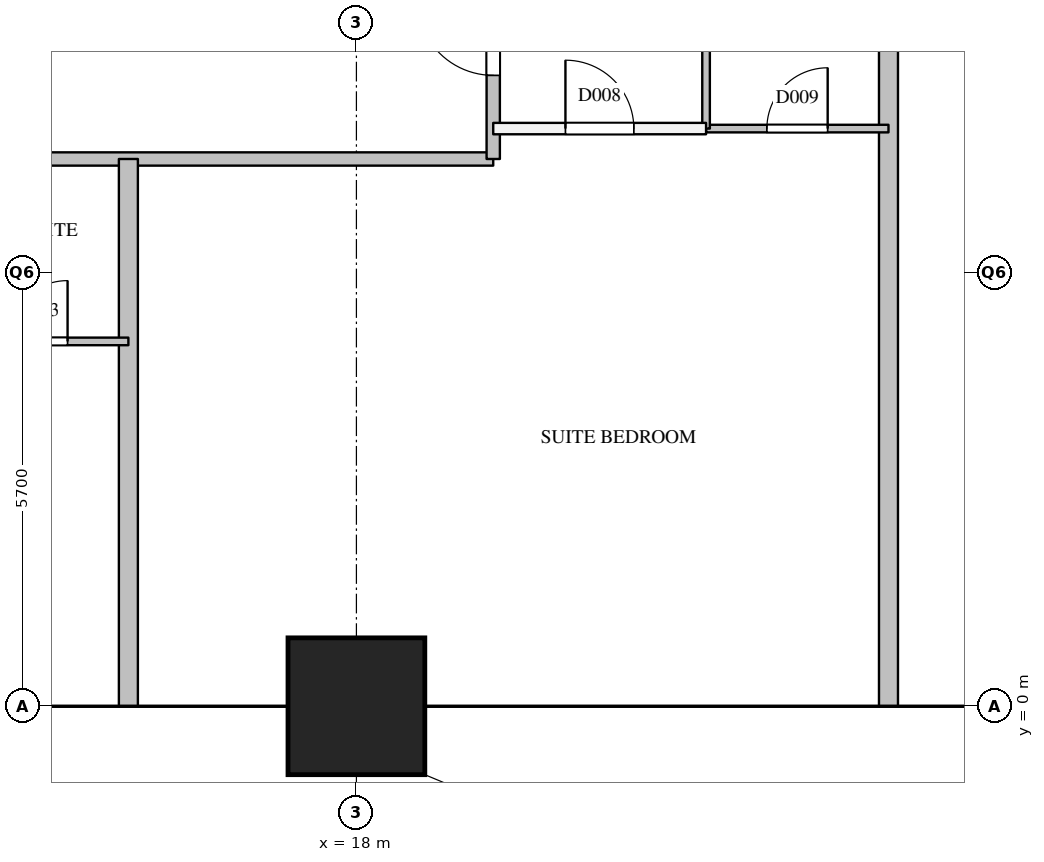
"""IFC4 building model, lengths in metres.
Left out: names, types, materials, properties, quantities, classifications, styles, units other than length and angle.
Written with IfcOpenShell. Run it as: python <this file> out.ifc"""

import sys

from ifc_helpers import new_model, si_unit, direction, frame, frame_2d, origin, origin_2d, place, context, subcontext, project, spatial, rectangle, extrude, element, fill, save


model = new_model("IFC4")
c1 = context("Model", 3, precision=1e-05, world=origin(), true_north=direction((0.0, 1.0)))
c2 = subcontext(c1, "Body", "Model", "MODEL_VIEW")
j1 = project(units=[si_unit("LENGTHUNIT", "METRE"), si_unit("PLANEANGLEUNIT", "RADIAN")], contexts=[c1])
p1 = place(None, origin())
s1 = spatial("IfcSite", under=j1, at=p1, CompositionType="ELEMENT")
p2 = place(p1, origin())
s2 = spatial("IfcBuilding", under=s1, at=p2, CompositionType="ELEMENT")
p3 = place(p2, frame((0.0, 0.0, 72.8)))
s3 = spatial("IfcBuildingStorey", under=s2, at=p3, CompositionType="ELEMENT", Elevation=72.8)
p4 = place(p3, frame((18.0, 0.0, 0.0), z_axis=(0.0, 0.0, 1.0), x_axis=(1.0, 0.0, 0.0)))
e1 = element("IfcColumn", 1, at=p4, inside=s3, PredefinedType="COLUMN", context=c2, shape_type="SweptSolid", body=[
    extrude(rectangle(XDim=1.8, YDim=1.8, at=origin_2d()), origin(), (0.0, 0.0, 1.0), 5.0),
])
p5 = place(p3, frame((7.2, 7.2, 0.0), z_axis=(0.0, 0.0, 1.0), x_axis=(1.0, 0.0, 0.0)))
e2 = element("IfcWall", 2, at=p5, inside=s3, PredefinedType="PARTITIONING", context=c2, shape_type="SweptSolid", body=[
    extrude(rectangle(XDim=12.6, YDim=0.175, at=frame_2d((6.3, 0.0))), origin(), (0.0, 0.0, 1.0), 4.7),
])
p6 = place(p5, frame((3.6, 0.0, 0.0)))
e3 = element("IfcOpeningElement", 3, at=p6, cuts=e2, PredefinedType="OPENING", context=c2, shape_type="SweptSolid", body=[
    extrude(rectangle(XDim=1.0, YDim=2.1, at=frame_2d((0.5, 1.05))), frame((0.0, 0.097, 0.0), z_axis=(0.0, -1.0, 0.0), x_axis=(1.0, 0.0, 0.0)), (0.0, 0.0, 1.0), 0.195),
])
p7 = place(p5, frame((0.95, 0.0, 0.0)))
e4 = element("IfcOpeningElement", 4, at=p7, cuts=e2, PredefinedType="OPENING", context=c2, shape_type="SweptSolid", body=[
    extrude(rectangle(XDim=0.9, YDim=2.1, at=frame_2d((0.45, 1.05))), frame((0.0, 0.097, 0.0), z_axis=(0.0, -1.0, 0.0), x_axis=(1.0, 0.0, 0.0)), (0.0, 0.0, 1.0), 0.195),
])
p8 = place(p3, frame((19.8, 7.2, 0.0), z_axis=(0.0, 0.0, 1.0), x_axis=(0.0, 1.0, 0.0)))
e5 = element("IfcWall", 5, at=p8, inside=s3, PredefinedType="PARTITIONING", context=c2, shape_type="SweptSolid", body=[
    extrude(rectangle(XDim=16.49, YDim=0.175, at=frame_2d((8.245, 0.0))), origin(), (0.0, 0.0, 1.0), 4.7),
])
p9 = place(p8, frame((1.1, 0.0, 0.0)))
e6 = element("IfcOpeningElement", 6, at=p9, cuts=e5, PredefinedType="OPENING", context=c2, shape_type="SweptSolid", body=[
    extrude(rectangle(XDim=1.0, YDim=2.1, at=frame_2d((0.5, 1.05))), frame((0.0, 0.097, 0.0), z_axis=(0.0, -1.0, 0.0), x_axis=(1.0, 0.0, 0.0)), (0.0, 0.0, 1.0), 0.195),
])
p10 = place(p8, frame((4.8, 0.0, 0.0)))
e7 = element("IfcOpeningElement", 7, at=p10, cuts=e5, PredefinedType="OPENING", context=c2, shape_type="SweptSolid", body=[
    extrude(rectangle(XDim=1.0, YDim=2.1, at=frame_2d((0.5, 1.05))), frame((0.0, 0.097, 0.0), z_axis=(0.0, -1.0, 0.0), x_axis=(1.0, 0.0, 0.0)), (0.0, 0.0, 1.0), 0.195),
])
p11 = place(p8, frame((11.645, 0.0, 0.0)))
e8 = element("IfcOpeningElement", 8, at=p11, cuts=e5, PredefinedType="OPENING", context=c2, shape_type="SweptSolid", body=[
    extrude(rectangle(XDim=1.0, YDim=2.1, at=frame_2d((0.5, 1.05))), frame((0.0, 0.097, 0.0), z_axis=(0.0, -1.0, 0.0), x_axis=(1.0, 0.0, 0.0)), (0.0, 0.0, 1.0), 0.195),
])
p12 = place(p3, frame((19.8, 7.6, 0.0), z_axis=(0.0, 0.0, 1.0), x_axis=(1.0, 0.0, 0.0)))
e9 = element("IfcWall", 9, at=p12, inside=s3, PredefinedType="PARTITIONING", context=c2, shape_type="SweptSolid", body=[
    extrude(rectangle(XDim=2.8, YDim=0.15, at=frame_2d((1.4, 0.0))), origin(), (0.0, 0.0, 1.0), 4.7),
])
p13 = place(p12, frame((0.95, 0.0, 0.0)))
e10 = element("IfcOpeningElement", 10, at=p13, cuts=e9, PredefinedType="OPENING", context=c2, shape_type="SweptSolid", body=[
    extrude(rectangle(XDim=0.9, YDim=2.1, at=frame_2d((0.45, 1.05))), frame((0.0, 0.085, 0.0), z_axis=(0.0, -1.0, 0.0), x_axis=(1.0, 0.0, 0.0)), (0.0, 0.0, 1.0), 0.17),
])
p14 = place(p3, frame((15.0, 0.0, 0.0), z_axis=(0.0, 0.0, 1.0), x_axis=(0.0, 1.0, 0.0)))
e11 = element("IfcWall", 11, at=p14, inside=s3, PredefinedType="PARTITIONING", context=c2, shape_type="SweptSolid", body=[
    extrude(rectangle(XDim=7.2, YDim=0.25, at=frame_2d((3.6, 0.0))), origin(), (0.0, 0.0, 1.0), 3.59),
])
p15 = place(p3, frame((25.0, 0.0, 0.0), z_axis=(0.0, 0.0, 1.0), x_axis=(0.0, 1.0, 0.0)))
e12 = element("IfcWall", 12, at=p15, inside=s3, PredefinedType="PARTITIONING", context=c2, shape_type="SweptSolid", body=[
    extrude(rectangle(XDim=35.0, YDim=0.25, at=frame_2d((17.5, 0.0))), origin(), (0.0, 0.0, 1.0), 3.59),
])
p16 = place(p3, frame((12.6, 4.8, 0.0), z_axis=(0.0, 0.0, 1.0), x_axis=(1.0, 0.0, 0.0)))
e13 = element("IfcWall", 13, at=p16, inside=s3, PredefinedType="PARTITIONING", context=c2, shape_type="SweptSolid", body=[
    extrude(rectangle(XDim=2.4, YDim=0.1, at=frame_2d((1.2, 0.0))), origin(), (0.0, 0.0, 1.0), 4.7),
])
p17 = place(p16, frame((0.8, 0.0, 0.0)))
e14 = element("IfcOpeningElement", 14, at=p17, cuts=e13, PredefinedType="OPENING", context=c2, shape_type="SweptSolid", body=[
    extrude(rectangle(XDim=0.8, YDim=2.1, at=frame_2d((0.4, 1.05))), frame((0.0, 0.06, 0.0), z_axis=(0.0, -1.0, 0.0), x_axis=(1.0, 0.0, 0.0)), (0.0, 0.0, 1.0), 0.12),
])
p18 = place(p3, frame((22.6, 7.6, 0.0), z_axis=(0.0, 0.0, 1.0), x_axis=(1.0, 0.0, 0.0)))
e15 = element("IfcWall", 15, at=p18, inside=s3, PredefinedType="PARTITIONING", context=c2, shape_type="SweptSolid", body=[
    extrude(rectangle(XDim=2.4, YDim=0.1, at=frame_2d((1.2, 0.0))), origin(), (0.0, 0.0, 1.0), 4.7),
])
p19 = place(p18, frame((0.8, 0.0, 0.0)))
e16 = element("IfcOpeningElement", 16, at=p19, cuts=e15, PredefinedType="OPENING", context=c2, shape_type="SweptSolid", body=[
    extrude(rectangle(XDim=0.8, YDim=2.1, at=frame_2d((0.4, 1.05))), frame((0.0, 0.06, 0.0), z_axis=(0.0, -1.0, 0.0), x_axis=(1.0, 0.0, 0.0)), (0.0, 0.0, 1.0), 0.12),
])
p20 = place(p3, frame((22.6, 7.6, 0.0), z_axis=(0.0, 0.0, 1.0), x_axis=(0.0, 1.0, 0.0)))
e17 = element("IfcWall", 17, at=p20, inside=s3, PredefinedType="PARTITIONING", context=c2, shape_type="SweptSolid", body=[
    extrude(rectangle(XDim=2.4, YDim=0.1, at=frame_2d((1.2, 0.0))), origin(), (0.0, 0.0, 1.0), 4.7),
])
p21 = place(p17, origin())
e18 = element("IfcDoor", 18, at=p21, inside=s3, OperationType="SINGLE_SWING_RIGHT", PredefinedType="DOOR", context=c2, shape_type="SweptSolid", body=[
    extrude(rectangle(XDim=0.8, YDim=2.1, at=frame_2d((0.4, 1.05))), frame((0.0, 0.025, 0.0), z_axis=(0.0, -1.0, 0.0), x_axis=(1.0, 0.0, 0.0)), (0.0, 0.0, 1.0), 0.05),
])
fill(e14, e18)
p22 = place(p9, origin())
e19 = element("IfcDoor", 19, at=p22, inside=s3, OperationType="SINGLE_SWING_RIGHT", PredefinedType="DOOR", context=c2, shape_type="SweptSolid", body=[
    extrude(rectangle(XDim=1.0, YDim=2.1, at=frame_2d((0.5, 1.05))), frame((0.0, 0.025, 0.0), z_axis=(0.0, -1.0, 0.0), x_axis=(1.0, 0.0, 0.0)), (0.0, 0.0, 1.0), 0.05),
])
fill(e6, e19)
p23 = place(p13, origin())
e20 = element("IfcDoor", 20, at=p23, inside=s3, OperationType="SINGLE_SWING_LEFT", PredefinedType="DOOR", context=c2, shape_type="SweptSolid", body=[
    extrude(rectangle(XDim=0.9, YDim=2.1, at=frame_2d((0.45, 1.05))), frame((0.0, 0.025, 0.0), z_axis=(0.0, -1.0, 0.0), x_axis=(1.0, 0.0, 0.0)), (0.0, 0.0, 1.0), 0.05),
])
fill(e10, e20)
p24 = place(p19, origin())
e21 = element("IfcDoor", 21, at=p24, inside=s3, OperationType="SINGLE_SWING_RIGHT", PredefinedType="DOOR", context=c2, shape_type="SweptSolid", body=[
    extrude(rectangle(XDim=0.8, YDim=2.1, at=frame_2d((0.4, 1.05))), frame((0.0, 0.025, 0.0), z_axis=(0.0, -1.0, 0.0), x_axis=(1.0, 0.0, 0.0)), (0.0, 0.0, 1.0), 0.05),
])
fill(e16, e21)
save(model, sys.argv[1])
